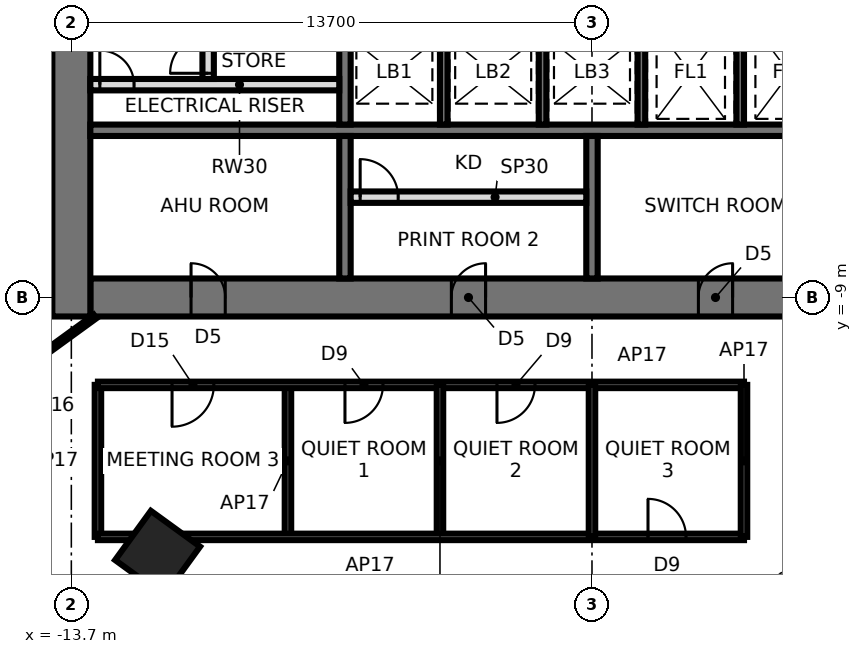
"""IFC4 building model, lengths in metres.
Left out: names, types, materials, properties, quantities, classifications, styles, units other than length and angle.
Written with IfcOpenShell. Run it as: python <this file> out.ifc"""

import sys

from ifc_helpers import new_model, si_unit, direction, frame, frame_2d, origin, origin_2d, place, context, subcontext, project, spatial, rectangle, extrude, element, fill, save


model = new_model("IFC4")
c1 = context("Model", 3, precision=1e-05, world=origin(), true_north=direction((0.0, 1.0)))
c2 = subcontext(c1, "Body", "Model", "MODEL_VIEW")
j1 = project(units=[si_unit("LENGTHUNIT", "METRE"), si_unit("PLANEANGLEUNIT", "RADIAN")], contexts=[c1])
p1 = place(None, origin())
s1 = spatial("IfcSite", under=j1, at=p1, CompositionType="ELEMENT")
p2 = place(p1, origin())
s2 = spatial("IfcBuilding", under=s1, at=p2, CompositionType="ELEMENT")
p3 = place(p2, frame((0.0, 0.0, 135.3)))
s3 = spatial("IfcBuildingStorey", under=s2, at=p3, CompositionType="ELEMENT", Elevation=135.3)
p4 = place(p3, frame((-11.43, -15.733, 0.0), z_axis=(0.0, 0.0, 1.0), x_axis=(-0.587785252292, -0.809016994375, 0.0)))
e1 = element("IfcColumn", 1, at=p4, inside=s3, PredefinedType="COLUMN", context=c2, shape_type="SweptSolid", body=[
    extrude(rectangle(XDim=1.6, YDim=1.6, at=origin_2d()), origin(), (0.0, 0.0, 1.0), 3.9),
])
p5 = place(p3, frame((-13.2, -9.0, 0.0), z_axis=(0.0, 0.0, 1.0), x_axis=(1.0, 0.0, 0.0)))
e2 = element("IfcWall", 2, at=p5, inside=s3, PredefinedType="SHEAR", context=c2, shape_type="SweptSolid", body=[
    extrude(rectangle(XDim=26.4, YDim=1.0, at=frame_2d((13.2, 0.0))), origin(), (0.0, 0.0, 1.0), 3.9),
])
p6 = place(p5, frame((2.65, 0.0, 0.0)))
e3 = element("IfcOpeningElement", 3, at=p6, cuts=e2, PredefinedType="OPENING", context=c2, shape_type="SweptSolid", body=[
    extrude(rectangle(XDim=0.9, YDim=2.1, at=frame_2d((0.45, 1.05))), frame((0.0, 0.51, 0.0), z_axis=(0.0, -1.0, 0.0), x_axis=(1.0, 0.0, 0.0)), (0.0, 0.0, 1.0), 1.02),
])
p7 = place(p5, frame((9.5, 0.0, 0.0)))
e4 = element("IfcOpeningElement", 4, at=p7, cuts=e2, PredefinedType="OPENING", context=c2, shape_type="SweptSolid", body=[
    extrude(rectangle(XDim=0.9, YDim=2.1, at=frame_2d((0.45, 1.05))), frame((0.0, 0.51, 0.0), z_axis=(0.0, -1.0, 0.0), x_axis=(1.0, 0.0, 0.0)), (0.0, 0.0, 1.0), 1.02),
])
p8 = place(p5, frame((16.0, 0.0, 0.0)))
e5 = element("IfcOpeningElement", 5, at=p8, cuts=e2, PredefinedType="OPENING", context=c2, shape_type="SweptSolid", body=[
    extrude(rectangle(XDim=0.9, YDim=2.1, at=frame_2d((0.45, 1.05))), frame((0.0, 0.51, 0.0), z_axis=(0.0, -1.0, 0.0), x_axis=(1.0, 0.0, 0.0)), (0.0, 0.0, 1.0), 1.02),
])
p9 = place(p5, frame((22.85, 0.0, 0.0)))
e6 = element("IfcOpeningElement", 6, at=p9, cuts=e2, PredefinedType="OPENING", context=c2, shape_type="SweptSolid", body=[
    extrude(rectangle(XDim=0.9, YDim=2.1, at=frame_2d((0.45, 1.05))), frame((0.0, 0.51, 0.0), z_axis=(0.0, -1.0, 0.0), x_axis=(1.0, 0.0, 0.0)), (0.0, 0.0, 1.0), 1.02),
])
p10 = place(p3, frame((-13.7, 9.5, 0.0), z_axis=(0.0, 0.0, 1.0), x_axis=(0.0, -1.0, 0.0)))
e7 = element("IfcWall", 7, at=p10, inside=s3, PredefinedType="SHEAR", context=c2, shape_type="SweptSolid", body=[
    extrude(rectangle(XDim=19.0, YDim=1.0, at=frame_2d((9.5, 0.0))), origin(), (0.0, 0.0, 1.0), 3.9),
])
p11 = place(p10, frame((8.6, 0.0, 0.0)))
e8 = element("IfcOpeningElement", 8, at=p11, cuts=e7, PredefinedType="OPENING", context=c2, shape_type="SweptSolid", body=[
    extrude(rectangle(XDim=1.8, YDim=2.4, at=frame_2d((0.9, 1.2))), frame((0.0, 0.51, 0.0), z_axis=(0.0, -1.0, 0.0), x_axis=(1.0, 0.0, 0.0)), (0.0, 0.0, 1.0), 1.02),
])
p12 = place(p3, frame((-13.2, -4.6, 0.0), z_axis=(0.0, 0.0, 1.0), x_axis=(1.0, 0.0, 0.0)))
e9 = element("IfcWall", 9, at=p12, inside=s3, PredefinedType="SHEAR", context=c2, shape_type="SweptSolid", body=[
    extrude(rectangle(XDim=26.4, YDim=0.3, at=frame_2d((13.2, 0.0))), origin(), (0.0, 0.0, 1.0), 3.9),
])
p13 = place(p3, frame((-6.5, -1.75, 0.0), z_axis=(0.0, 0.0, 1.0), x_axis=(0.0, -1.0, 0.0)))
e10 = element("IfcWall", 10, at=p13, inside=s3, PredefinedType="SHEAR", context=c2, shape_type="SweptSolid", body=[
    extrude(rectangle(XDim=2.7, YDim=0.3, at=frame_2d((1.35, 0.0))), origin(), (0.0, 0.0, 1.0), 3.9),
])
p14 = place(p3, frame((-6.5, -4.75, 0.0), z_axis=(0.0, 0.0, 1.0), x_axis=(0.0, -1.0, 0.0)))
e11 = element("IfcWall", 11, at=p14, inside=s3, PredefinedType="SHEAR", context=c2, shape_type="SweptSolid", body=[
    extrude(rectangle(XDim=3.75, YDim=0.3, at=frame_2d((1.875, 0.0))), origin(), (0.0, 0.0, 1.0), 3.9),
])
for number, where, z_axis, x_axis in (
    (12, (-3.9, -1.75, 0.0), (0.0, 0.0, 1.0), (0.0, -1.0, 0.0)),
    (13, (-1.3, -1.75, 0.0), (0.0, 0.0, 1.0), (0.0, -1.0, 0.0)),
    (14, (1.3, -1.75, 0.0), (0.0, 0.0, 1.0), (0.0, -1.0, 0.0)),
    (15, (3.9, -1.75, 0.0), (0.0, 0.0, 1.0), (0.0, -1.0, 0.0)),
):
    element("IfcWall", number, at=place(p3, frame(where, z_axis=z_axis, x_axis=x_axis)), inside=s3, PredefinedType="SHEAR", context=c2, shape_type="SweptSolid", body=[
        extrude(rectangle(XDim=2.7, YDim=0.2, at=frame_2d((1.35, 0.0))), origin(), (0.0, 0.0, 1.0), 3.9),
    ])
p15 = place(p3, frame((0.0, -4.75, 0.0), z_axis=(0.0, 0.0, 1.0), x_axis=(0.0, -1.0, 0.0)))
e16 = element("IfcWall", 16, at=p15, inside=s3, PredefinedType="SHEAR", context=c2, shape_type="SweptSolid", body=[
    extrude(rectangle(XDim=3.75, YDim=0.3, at=frame_2d((1.875, 0.0))), origin(), (0.0, 0.0, 1.0), 3.9),
])
p16 = place(p3, frame((-6.35, -6.36, 0.0), z_axis=(0.0, 0.0, 1.0), x_axis=(1.0, 0.0, 0.0)))
e17 = element("IfcWall", 17, at=p16, inside=s3, PredefinedType="PARTITIONING", context=c2, shape_type="SweptSolid", body=[
    extrude(rectangle(XDim=6.2, YDim=0.3, at=frame_2d((3.1, 0.0))), origin(), (0.0, 0.0, 1.0), 3.74),
])
p17 = place(p16, frame((0.25, 0.0, 0.0)))
e18 = element("IfcOpeningElement", 18, at=p17, cuts=e17, PredefinedType="OPENING", context=c2, shape_type="SweptSolid", body=[
    extrude(rectangle(XDim=1.0, YDim=2.4, at=frame_2d((0.5, 1.2))), frame((0.0, 0.16, 0.0), z_axis=(0.0, -1.0, 0.0), x_axis=(1.0, 0.0, 0.0)), (0.0, 0.0, 1.0), 0.32),
])
p18 = place(p3, frame((-13.2, -3.4, 0.0), z_axis=(0.0, 0.0, 1.0), x_axis=(1.0, 0.0, 0.0)))
e19 = element("IfcWall", 19, at=p18, inside=s3, PredefinedType="SOLIDWALL", context=c2, shape_type="SweptSolid", body=[
    extrude(rectangle(XDim=6.55, YDim=0.3, at=frame_2d((3.275, 0.0))), origin(), (0.0, 0.0, 1.0), 3.74),
])
p19 = place(p18, frame((0.25, 0.0, 0.0)))
e20 = element("IfcOpeningElement", 20, at=p19, cuts=e19, PredefinedType="OPENING", context=c2, shape_type="SweptSolid", body=[
    extrude(rectangle(XDim=0.9, YDim=2.1, at=frame_2d((0.45, 1.05))), frame((0.0, 0.16, 0.0), z_axis=(0.0, -1.0, 0.0), x_axis=(1.0, 0.0, 0.0)), (0.0, 0.0, 1.0), 0.32),
])
p20 = place(p3, frame((-10.1, -3.25, 0.0), z_axis=(0.0, 0.0, 1.0), x_axis=(0.0, 1.0, 0.0)))
e21 = element("IfcWall", 21, at=p20, inside=s3, PredefinedType="PARTITIONING", context=c2, shape_type="SweptSolid", body=[
    extrude(rectangle(XDim=1.5, YDim=0.3, at=frame_2d((0.75, 0.0))), origin(), (0.0, 0.0, 1.0), 3.74),
])
p21 = place(p20, frame((0.15, 0.0, 0.0)))
e22 = element("IfcOpeningElement", 22, at=p21, cuts=e21, PredefinedType="OPENING", context=c2, shape_type="SweptSolid", body=[
    extrude(rectangle(XDim=1.0, YDim=2.4, at=frame_2d((0.5, 1.2))), frame((0.0, 0.16, 0.0), z_axis=(0.0, -1.0, 0.0), x_axis=(1.0, 0.0, 0.0)), (0.0, 0.0, 1.0), 0.32),
])
p22 = place(p3, frame((-13.076, -9.5, 0.0), z_axis=(0.0, 0.0, 1.0), x_axis=(-0.809023630932, -0.587776117747, 0.0)))
e23 = element("IfcWall", 23, at=p22, inside=s3, PredefinedType="PARTITIONING", context=c2, shape_type="SweptSolid", body=[
    extrude(rectangle(XDim=7.157, YDim=0.12, at=frame_2d((3.579, 0.0))), origin(), (0.0, 0.0, 1.0), 2.94),
])
p23 = place(p22, frame((2.202, 0.0, 0.0)))
e24 = element("IfcOpeningElement", 24, at=p23, cuts=e23, PredefinedType="OPENING", context=c2, shape_type="SweptSolid", body=[
    extrude(rectangle(XDim=1.0, YDim=2.4, at=frame_2d((0.5, 1.2))), frame((0.0, 0.07, 0.0), z_axis=(0.0, -1.0, 0.0), x_axis=(1.0, 0.0, 0.0)), (0.0, 0.0, 1.0), 0.14),
])
for number, where, z_axis, x_axis in (
    (25, (-13.0, -15.3, 0.0), (0.0, 0.0, 1.0), (0.0, 1.0, 0.0)),
    (26, (-8.0, -11.3, 0.0), (0.0, 0.0, 1.0), (0.0, -1.0, 0.0)),
):
    element("IfcWall", number, at=place(p3, frame(where, z_axis=z_axis, x_axis=x_axis)), inside=s3, PredefinedType="PARTITIONING", context=c2, shape_type="SweptSolid", body=[
        extrude(rectangle(XDim=4.0, YDim=0.17, at=frame_2d((2.0, 0.0))), origin(), (0.0, 0.0, 1.0), 3.74),
    ])
p24 = place(p3, frame((-13.0, -11.3, 0.0), z_axis=(0.0, 0.0, 1.0), x_axis=(1.0, 0.0, 0.0)))
e27 = element("IfcWall", 27, at=p24, inside=s3, PredefinedType="PARTITIONING", context=c2, shape_type="SweptSolid", body=[
    extrude(rectangle(XDim=17.0, YDim=0.17, at=frame_2d((8.5, 0.0))), origin(), (0.0, 0.0, 1.0), 3.74),
])
p25 = place(p24, frame((1.95, 0.0, 0.0)))
e28 = element("IfcOpeningElement", 28, at=p25, cuts=e27, PredefinedType="OPENING", context=c2, shape_type="SweptSolid", body=[
    extrude(rectangle(XDim=1.1, YDim=2.4, at=frame_2d((0.55, 1.2))), frame((0.0, 0.095, 0.0), z_axis=(0.0, -1.0, 0.0), x_axis=(1.0, 0.0, 0.0)), (0.0, 0.0, 1.0), 0.19),
])
p26 = place(p24, frame((6.5, 0.0, 0.0)))
e29 = element("IfcOpeningElement", 29, at=p26, cuts=e27, PredefinedType="OPENING", context=c2, shape_type="SweptSolid", body=[
    extrude(rectangle(XDim=1.0, YDim=2.4, at=frame_2d((0.5, 1.2))), frame((0.0, 0.095, 0.0), z_axis=(0.0, -1.0, 0.0), x_axis=(1.0, 0.0, 0.0)), (0.0, 0.0, 1.0), 0.19),
])
p27 = place(p24, frame((10.5, 0.0, 0.0)))
e30 = element("IfcOpeningElement", 30, at=p27, cuts=e27, PredefinedType="OPENING", context=c2, shape_type="SweptSolid", body=[
    extrude(rectangle(XDim=1.0, YDim=2.4, at=frame_2d((0.5, 1.2))), frame((0.0, 0.095, 0.0), z_axis=(0.0, -1.0, 0.0), x_axis=(1.0, 0.0, 0.0)), (0.0, 0.0, 1.0), 0.19),
])
p28 = place(p3, frame((-4.0, -11.3, 0.0), z_axis=(0.0, 0.0, 1.0), x_axis=(0.0, -1.0, 0.0)))
e31 = element("IfcWall", 31, at=p28, inside=s3, PredefinedType="PARTITIONING", context=c2, shape_type="SweptSolid", body=[
    extrude(rectangle(XDim=4.0, YDim=0.17, at=frame_2d((2.0, 0.0))), origin(), (0.0, 0.0, 1.0), 3.74),
])
p29 = place(p3, frame((4.0, -15.3, 0.0), z_axis=(0.0, 0.0, 1.0), x_axis=(-1.0, 0.0, 0.0)))
e32 = element("IfcWall", 32, at=p29, inside=s3, PredefinedType="PARTITIONING", context=c2, shape_type="SweptSolid", body=[
    extrude(rectangle(XDim=17.0, YDim=0.17, at=frame_2d((8.5, 0.0))), origin(), (0.0, 0.0, 1.0), 3.286),
])
p30 = place(p29, frame((1.526, 0.0, 0.0)))
e33 = element("IfcOpeningElement", 33, at=p30, cuts=e32, PredefinedType="OPENING", context=c2, shape_type="SweptSolid", body=[
    extrude(rectangle(XDim=1.0, YDim=2.4, at=frame_2d((0.5, 1.2))), frame((0.0, 0.095, 0.0), z_axis=(0.0, -1.0, 0.0), x_axis=(1.0, 0.0, 0.0)), (0.0, 0.0, 1.0), 0.19),
])
p31 = place(p3, frame((0.0, -11.3, 0.0), z_axis=(0.0, 0.0, 1.0), x_axis=(0.0, -1.0, 0.0)))
e34 = element("IfcWall", 34, at=p31, inside=s3, PredefinedType="PARTITIONING", context=c2, shape_type="SweptSolid", body=[
    extrude(rectangle(XDim=4.0, YDim=0.17, at=frame_2d((2.0, 0.0))), origin(), (0.0, 0.0, 1.0), 2.94),
])
p32 = place(p3, frame((4.0, -11.3, 0.0), z_axis=(0.0, 0.0, 1.0), x_axis=(0.0, -1.0, 0.0)))
e35 = element("IfcWall", 35, at=p32, inside=s3, PredefinedType="PARTITIONING", context=c2, shape_type="SweptSolid", body=[
    extrude(rectangle(XDim=4.0, YDim=0.17, at=frame_2d((2.0, 0.0))), origin(), (0.0, 0.0, 1.0), 3.74),
])
p33 = place(p6, origin())
e36 = element("IfcDoor", 36, at=p33, inside=s3, OperationType="SINGLE_SWING_LEFT", PredefinedType="DOOR", context=c2, shape_type="SweptSolid", body=[
    extrude(rectangle(XDim=0.82, YDim=2.06, at=frame_2d((0.45, 1.03))), frame((0.0, 0.025, 0.0), z_axis=(0.0, -1.0, 0.0), x_axis=(1.0, 0.0, 0.0)), (0.0, 0.0, 1.0), 0.05),
    extrude(rectangle(XDim=0.04, YDim=2.1, at=frame_2d((0.02, 1.05))), frame((0.0, 0.25, 0.0), z_axis=(0.0, -1.0, 0.0), x_axis=(1.0, 0.0, 0.0)), (0.0, 0.0, 1.0), 0.5),
    extrude(rectangle(XDim=0.04, YDim=2.1, at=frame_2d((0.88, 1.05))), frame((0.0, 0.25, 0.0), z_axis=(0.0, -1.0, 0.0), x_axis=(1.0, 0.0, 0.0)), (0.0, 0.0, 1.0), 0.5),
    extrude(rectangle(XDim=0.82, YDim=0.04, at=frame_2d((0.45, 2.08))), frame((0.0, 0.25, 0.0), z_axis=(0.0, -1.0, 0.0), x_axis=(1.0, 0.0, 0.0)), (0.0, 0.0, 1.0), 0.5),
])
fill(e3, e36)
p34 = place(p7, origin())
e37 = element("IfcDoor", 37, at=p34, inside=s3, OperationType="SINGLE_SWING_RIGHT", PredefinedType="DOOR", context=c2, shape_type="SweptSolid", body=[
    extrude(rectangle(XDim=0.82, YDim=2.06, at=frame_2d((0.45, 1.03))), frame((0.0, 0.025, 0.0), z_axis=(0.0, -1.0, 0.0), x_axis=(1.0, 0.0, 0.0)), (0.0, 0.0, 1.0), 0.05),
    extrude(rectangle(XDim=0.04, YDim=2.1, at=frame_2d((0.02, 1.05))), frame((0.0, 0.25, 0.0), z_axis=(0.0, -1.0, 0.0), x_axis=(1.0, 0.0, 0.0)), (0.0, 0.0, 1.0), 0.5),
    extrude(rectangle(XDim=0.04, YDim=2.1, at=frame_2d((0.88, 1.05))), frame((0.0, 0.25, 0.0), z_axis=(0.0, -1.0, 0.0), x_axis=(1.0, 0.0, 0.0)), (0.0, 0.0, 1.0), 0.5),
    extrude(rectangle(XDim=0.82, YDim=0.04, at=frame_2d((0.45, 2.08))), frame((0.0, 0.25, 0.0), z_axis=(0.0, -1.0, 0.0), x_axis=(1.0, 0.0, 0.0)), (0.0, 0.0, 1.0), 0.5),
])
fill(e4, e37)
p35 = place(p8, origin())
e38 = element("IfcDoor", 38, at=p35, inside=s3, OperationType="SINGLE_SWING_RIGHT", PredefinedType="DOOR", context=c2, shape_type="SweptSolid", body=[
    extrude(rectangle(XDim=0.82, YDim=2.06, at=frame_2d((0.45, 1.03))), frame((0.0, 0.025, 0.0), z_axis=(0.0, -1.0, 0.0), x_axis=(1.0, 0.0, 0.0)), (0.0, 0.0, 1.0), 0.05),
    extrude(rectangle(XDim=0.04, YDim=2.1, at=frame_2d((0.02, 1.05))), frame((0.0, 0.25, 0.0), z_axis=(0.0, -1.0, 0.0), x_axis=(1.0, 0.0, 0.0)), (0.0, 0.0, 1.0), 0.5),
    extrude(rectangle(XDim=0.04, YDim=2.1, at=frame_2d((0.88, 1.05))), frame((0.0, 0.25, 0.0), z_axis=(0.0, -1.0, 0.0), x_axis=(1.0, 0.0, 0.0)), (0.0, 0.0, 1.0), 0.5),
    extrude(rectangle(XDim=0.82, YDim=0.04, at=frame_2d((0.45, 2.08))), frame((0.0, 0.25, 0.0), z_axis=(0.0, -1.0, 0.0), x_axis=(1.0, 0.0, 0.0)), (0.0, 0.0, 1.0), 0.5),
])
fill(e5, e38)
p36 = place(p17, origin())
e39 = element("IfcDoor", 39, at=p36, inside=s3, OperationType="SINGLE_SWING_LEFT", PredefinedType="DOOR", context=c2, shape_type="SweptSolid", body=[
    extrude(rectangle(XDim=1.0, YDim=2.4, at=frame_2d((0.5, 1.2))), frame((0.0, 0.025, 0.0), z_axis=(0.0, -1.0, 0.0), x_axis=(1.0, 0.0, 0.0)), (0.0, 0.0, 1.0), 0.05),
])
fill(e18, e39)
p37 = place(p19, origin())
e40 = element("IfcDoor", 40, at=p37, inside=s3, OperationType="SINGLE_SWING_LEFT", PredefinedType="DOOR", context=c2, shape_type="SweptSolid", body=[
    extrude(rectangle(XDim=0.9, YDim=2.1, at=frame_2d((0.45, 1.05))), frame((0.0, 0.025, 0.0), z_axis=(0.0, -1.0, 0.0), x_axis=(1.0, 0.0, 0.0)), (0.0, 0.0, 1.0), 0.05),
])
fill(e20, e40)
p38 = place(p21, origin())
e41 = element("IfcDoor", 41, at=p38, inside=s3, OperationType="SINGLE_SWING_LEFT", PredefinedType="DOOR", context=c2, shape_type="SweptSolid", body=[
    extrude(rectangle(XDim=1.0, YDim=2.4, at=frame_2d((0.5, 1.2))), frame((0.0, 0.025, 0.0), z_axis=(0.0, -1.0, 0.0), x_axis=(1.0, 0.0, 0.0)), (0.0, 0.0, 1.0), 0.05),
])
fill(e22, e41)
p39 = place(p25, frame((1.1, 0.0, 0.0), z_axis=(0.0, 0.0, 1.0), x_axis=(-1.0, 0.0, 0.0)))
e42 = element("IfcDoor", 42, at=p39, inside=s3, OperationType="SINGLE_SWING_RIGHT", PredefinedType="DOOR", context=c2, shape_type="SweptSolid", body=[
    extrude(rectangle(XDim=1.1, YDim=2.4, at=frame_2d((0.55, 1.2))), frame((0.0, 0.025, 0.0), z_axis=(0.0, -1.0, 0.0), x_axis=(1.0, 0.0, 0.0)), (0.0, 0.0, 1.0), 0.05),
])
fill(e28, e42)
p40 = place(p26, frame((1.0, 0.0, 0.0), z_axis=(0.0, 0.0, 1.0), x_axis=(-1.0, 0.0, 0.0)))
e43 = element("IfcDoor", 43, at=p40, inside=s3, OperationType="SINGLE_SWING_RIGHT", PredefinedType="DOOR", context=c2, shape_type="SweptSolid", body=[
    extrude(rectangle(XDim=1.0, YDim=2.4, at=frame_2d((0.5, 1.2))), frame((0.0, 0.025, 0.0), z_axis=(0.0, -1.0, 0.0), x_axis=(1.0, 0.0, 0.0)), (0.0, 0.0, 1.0), 0.05),
])
fill(e29, e43)
p41 = place(p27, frame((1.0, 0.0, 0.0), z_axis=(0.0, 0.0, 1.0), x_axis=(-1.0, 0.0, 0.0)))
e44 = element("IfcDoor", 44, at=p41, inside=s3, OperationType="SINGLE_SWING_RIGHT", PredefinedType="DOOR", context=c2, shape_type="SweptSolid", body=[
    extrude(rectangle(XDim=1.0, YDim=2.4, at=frame_2d((0.5, 1.2))), frame((0.0, 0.025, 0.0), z_axis=(0.0, -1.0, 0.0), x_axis=(1.0, 0.0, 0.0)), (0.0, 0.0, 1.0), 0.05),
])
fill(e30, e44)
p42 = place(p30, frame((1.0, 0.0, 0.0), z_axis=(0.0, 0.0, 1.0), x_axis=(-1.0, 0.0, 0.0)))
e45 = element("IfcDoor", 45, at=p42, inside=s3, OperationType="SINGLE_SWING_LEFT", PredefinedType="DOOR", context=c2, shape_type="SweptSolid", body=[
    extrude(rectangle(XDim=1.0, YDim=2.4, at=frame_2d((0.5, 1.2))), frame((0.0, 0.025, 0.0), z_axis=(0.0, -1.0, 0.0), x_axis=(1.0, 0.0, 0.0)), (0.0, 0.0, 1.0), 0.05),
])
fill(e33, e45)
save(model, sys.argv[1])
